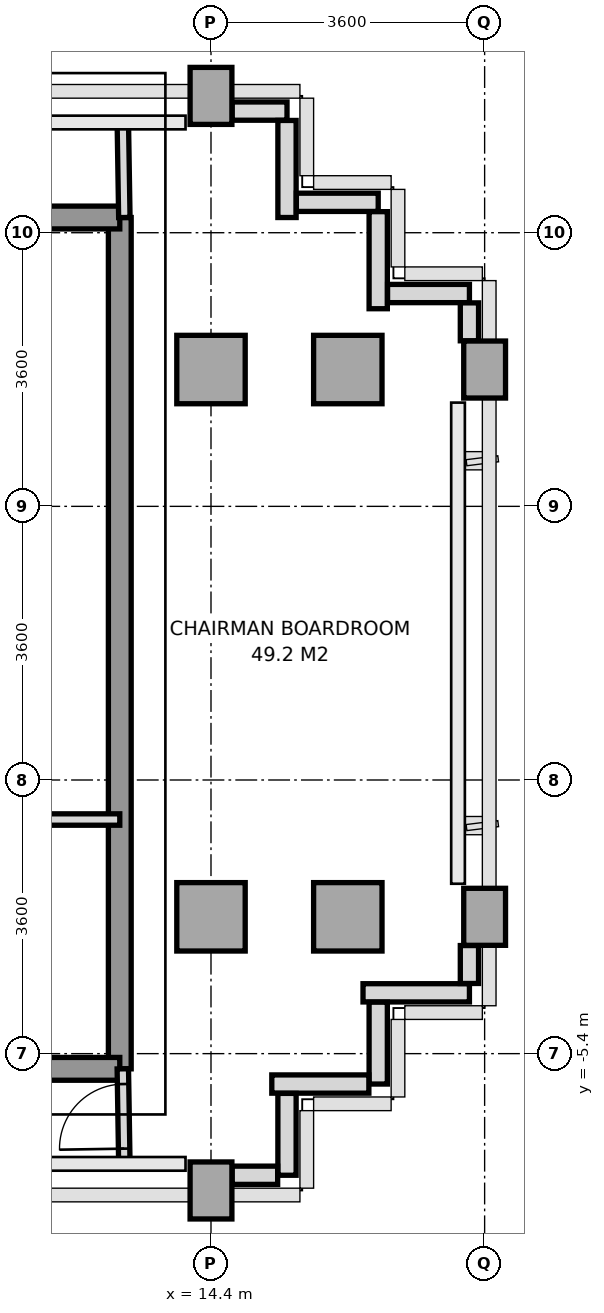
"""IFC4 building model, lengths in metres.
Left out: names, types, materials, properties, quantities, classifications, styles, units other than length and angle.
Written with IfcOpenShell. Run it as: python <this file> out.ifc"""

import sys

from ifc_helpers import new_model, si_unit, direction, frame, frame_2d, origin, origin_2d, place, context, subcontext, project, spatial, rectangle, extrude, source, transform, mapped, element, fill, save


model = new_model("IFC4")
c1 = context("Model", 3, precision=1e-05, world=origin(), true_north=direction((0.0, 1.0)))
c2 = subcontext(c1, "Body", "Model", "MODEL_VIEW")
j1 = project(units=[si_unit("LENGTHUNIT", "METRE"), si_unit("PLANEANGLEUNIT", "RADIAN")], contexts=[c1])
p1 = place(None, origin())
s1 = spatial("IfcSite", under=j1, at=p1, CompositionType="ELEMENT")
p2 = place(p1, origin())
s2 = spatial("IfcBuilding", under=s1, at=p2, CompositionType="ELEMENT")
p3 = place(p2, frame((0.0, 0.0, 226.8)))
s3 = spatial("IfcBuildingStorey", under=s2, at=p3, CompositionType="ELEMENT", Elevation=226.8)
m1 = source(origin(), c2, "Body", "SweptSolid", [
    extrude(rectangle(XDim=0.55, YDim=0.75, at=origin_2d()), origin(), (0.0, 0.0, 1.0), 3.01),
])
p4 = place(p3, frame((14.4, -7.2, 0.0), z_axis=(0.0, 0.0, 1.0), x_axis=(1.0, 0.0, 0.0)))
e1 = element("IfcColumn", 1, at=p4, inside=s3, PredefinedType="COLUMN", context=c2, shape_type="MappedRepresentation", body=[
    mapped(m1, transform((0.0, 0.0, 0.0), x_axis=(1.0, 0.0, 0.0), y_axis=(0.0, 1.0, 0.0), z_axis=(0.0, 0.0, 1.0), scale=1.0)),
])
m2 = source(origin(), c2, "Body", "SweptSolid", [
    extrude(rectangle(XDim=0.9, YDim=0.9, at=origin_2d()), origin(), (0.0, 0.0, 1.0), 3.01),
])
for number, where, z_axis, x_axis in (
    (2, (14.4, -3.6, 0.0), (0.0, 0.0, 1.0), (1.0, 0.0, 0.0)),
    (3, (14.4, 3.6, 0.0), (0.0, 0.0, 1.0), (1.0, 0.0, 0.0)),
):
    element("IfcColumn", number, at=place(p3, frame(where, z_axis=z_axis, x_axis=x_axis)), inside=s3, PredefinedType="COLUMN", context=c2, shape_type="MappedRepresentation", body=[
        mapped(m2, transform((0.0, 0.0, 0.0), x_axis=(1.0, 0.0, 0.0), y_axis=(0.0, 1.0, 0.0), z_axis=(0.0, 0.0, 1.0), scale=1.0)),
    ])
p5 = place(p3, frame((14.4, 7.2, 0.0), z_axis=(0.0, 0.0, 1.0), x_axis=(1.0, 0.0, 0.0)))
e4 = element("IfcColumn", 4, at=p5, inside=s3, PredefinedType="COLUMN", context=c2, shape_type="MappedRepresentation", body=[
    mapped(m1, transform((0.0, 0.0, 0.0), x_axis=(1.0, 0.0, 0.0), y_axis=(0.0, 1.0, 0.0), z_axis=(0.0, 0.0, 1.0), scale=1.0)),
])
for number, where, z_axis, x_axis in (
    (5, (16.2, -3.6, 0.0), (0.0, 0.0, 1.0), (1.0, 0.0, 0.0)),
    (6, (16.2, 3.6, 0.0), (0.0, 0.0, 1.0), (1.0, 0.0, 0.0)),
):
    element("IfcColumn", number, at=place(p3, frame(where, z_axis=z_axis, x_axis=x_axis)), inside=s3, PredefinedType="COLUMN", context=c2, shape_type="MappedRepresentation", body=[
        mapped(m2, transform((0.0, 0.0, 0.0), x_axis=(1.0, 0.0, 0.0), y_axis=(0.0, 1.0, 0.0), z_axis=(0.0, 0.0, 1.0), scale=1.0)),
    ])
for number, where, z_axis, x_axis in (
    (7, (18.0, -3.6, 0.0), (0.0, 0.0, 1.0), (1.0, 0.0, 0.0)),
    (8, (18.0, 3.6, 0.0), (0.0, 0.0, 1.0), (1.0, 0.0, 0.0)),
):
    element("IfcColumn", number, at=place(p3, frame(where, z_axis=z_axis, x_axis=x_axis)), inside=s3, PredefinedType="COLUMN", context=c2, shape_type="MappedRepresentation", body=[
        mapped(m1, transform((0.0, 0.0, 0.0), x_axis=(1.0, 0.0, 0.0), y_axis=(0.0, 1.0, 0.0), z_axis=(0.0, 0.0, 1.0), scale=1.0)),
    ])
p6 = place(p3, frame((17.8, -4.6, 0.0), z_axis=(0.0, 0.0, 1.0), x_axis=(-1.0, 0.0, 0.0)))
e9 = element("IfcWall", 9, at=p6, inside=s3, PredefinedType="PARAPET", context=c2, shape_type="SweptSolid", body=[
    extrude(rectangle(XDim=1.4, YDim=0.24, at=frame_2d((0.7, 0.0))), origin(), (0.0, 0.0, 1.0), 1.15),
])
p7 = place(p3, frame((16.6, -4.723, 0.0), z_axis=(0.0, 0.0, 1.0), x_axis=(0.0, -1.0, 0.0)))
e10 = element("IfcWall", 10, at=p7, inside=s3, PredefinedType="PARAPET", context=c2, shape_type="SweptSolid", body=[
    extrude(rectangle(XDim=1.077, YDim=0.24, at=frame_2d((0.539, 0.0))), origin(), (0.0, 0.0, 1.0), 1.15),
])
p8 = place(p3, frame((16.477, -5.8, 0.0), z_axis=(0.0, 0.0, 1.0), x_axis=(-1.0, 0.0, 0.0)))
e11 = element("IfcWall", 11, at=p8, inside=s3, PredefinedType="PARAPET", context=c2, shape_type="SweptSolid", body=[
    extrude(rectangle(XDim=1.277, YDim=0.24, at=frame_2d((0.639, 0.0))), origin(), (0.0, 0.0, 1.0), 1.15),
])
p9 = place(p3, frame((15.4, -5.923, 0.0), z_axis=(0.0, 0.0, 1.0), x_axis=(0.0, -1.0, 0.0)))
e12 = element("IfcWall", 12, at=p9, inside=s3, PredefinedType="PARAPET", context=c2, shape_type="SweptSolid", body=[
    extrude(rectangle(XDim=1.077, YDim=0.24, at=frame_2d((0.539, 0.0))), origin(), (0.0, 0.0, 1.0), 1.15),
])
p10 = place(p3, frame((15.277, -7.0, 0.0), z_axis=(0.0, 0.0, 1.0), x_axis=(-1.0, 0.0, 0.0)))
e13 = element("IfcWall", 13, at=p10, inside=s3, PredefinedType="PARAPET", context=c2, shape_type="SweptSolid", body=[
    extrude(rectangle(XDim=0.599, YDim=0.24, at=frame_2d((0.3, 0.0))), origin(), (0.0, 0.0, 1.0), 1.15),
])
p11 = place(p3, frame((14.678, 7.0, 0.0), z_axis=(0.0, 0.0, 1.0), x_axis=(1.0, 0.0, 0.0)))
e14 = element("IfcWall", 14, at=p11, inside=s3, PredefinedType="PARAPET", context=c2, shape_type="SweptSolid", body=[
    extrude(rectangle(XDim=0.722, YDim=0.24, at=frame_2d((0.361, 0.0))), origin(), (0.0, 0.0, 1.0), 1.15),
])
p12 = place(p3, frame((15.4, 6.877, 0.0), z_axis=(0.0, 0.0, 1.0), x_axis=(0.0, -1.0, 0.0)))
e15 = element("IfcWall", 15, at=p12, inside=s3, PredefinedType="PARAPET", context=c2, shape_type="SweptSolid", body=[
    extrude(rectangle(XDim=1.277, YDim=0.24, at=frame_2d((0.638, 0.0))), origin(), (0.0, 0.0, 1.0), 1.15),
])
p13 = place(p3, frame((15.523, 5.8, 0.0), z_axis=(0.0, 0.0, 1.0), x_axis=(1.0, 0.0, 0.0)))
e16 = element("IfcWall", 16, at=p13, inside=s3, PredefinedType="PARAPET", context=c2, shape_type="SweptSolid", body=[
    extrude(rectangle(XDim=1.077, YDim=0.24, at=frame_2d((0.539, 0.0))), origin(), (0.0, 0.0, 1.0), 1.15),
])
p14 = place(p3, frame((16.6, 5.677, 0.0), z_axis=(0.0, 0.0, 1.0), x_axis=(0.0, -1.0, 0.0)))
e17 = element("IfcWall", 17, at=p14, inside=s3, PredefinedType="PARAPET", context=c2, shape_type="SweptSolid", body=[
    extrude(rectangle(XDim=1.277, YDim=0.24, at=frame_2d((0.639, 0.0))), origin(), (0.0, 0.0, 1.0), 1.15),
])
p15 = place(p3, frame((16.723, 4.6, 0.0), z_axis=(0.0, 0.0, 1.0), x_axis=(1.0, 0.0, 0.0)))
e18 = element("IfcWall", 18, at=p15, inside=s3, PredefinedType="PARAPET", context=c2, shape_type="SweptSolid", body=[
    extrude(rectangle(XDim=1.077, YDim=0.24, at=frame_2d((0.539, 0.0))), origin(), (0.0, 0.0, 1.0), 1.15),
])
for number, where, z_axis, x_axis in (
    (19, (17.8, 4.477, 0.0), (0.0, 0.0, 1.0), (0.0, -1.0, 0.0)),
    (20, (17.8, -3.978, 0.0), (0.0, 0.0, 1.0), (0.0, -1.0, 0.0)),
):
    element("IfcWall", number, at=place(p3, frame(where, z_axis=z_axis, x_axis=x_axis)), inside=s3, PredefinedType="PARAPET", context=c2, shape_type="SweptSolid", body=[
        extrude(rectangle(XDim=0.499, YDim=0.24, at=frame_2d((0.25, 0.0))), origin(), (0.0, 0.0, 1.0), 1.15),
    ])
p16 = place(p3, frame((13.2, -5.6, 0.0), z_axis=(0.0, 0.0, 1.0), x_axis=(0.0, 1.0, 0.0)))
e21 = element("IfcWall", 21, at=p16, inside=s3, PredefinedType="SHEAR", context=c2, shape_type="SweptSolid", body=[
    extrude(rectangle(XDim=11.2, YDim=0.3, at=frame_2d((5.6, 0.0))), origin(), (0.0, 0.0, 1.0), 3.01),
])
p17 = place(p3, frame((11.356, 5.6, 0.0), z_axis=(0.0, 0.0, 1.0), x_axis=(1.0, 0.0, 0.0)))
e22 = element("IfcWall", 22, at=p17, inside=s3, PredefinedType="SHEAR", context=c2, shape_type="SweptSolid", body=[
    extrude(rectangle(XDim=1.844, YDim=0.3, at=frame_2d((0.922, 0.0))), origin(), (0.0, 0.0, 1.0), 3.01),
])
p18 = place(p3, frame((5.4, -5.6, 0.0), z_axis=(0.0, 0.0, 1.0), x_axis=(1.0, 0.0, 0.0)))
e23 = element("IfcWall", 23, at=p18, inside=s3, PredefinedType="SHEAR", context=c2, shape_type="SweptSolid", body=[
    extrude(rectangle(XDim=7.8, YDim=0.3, at=frame_2d((3.9, 0.0))), origin(), (0.0, 0.0, 1.0), 3.01),
])
p19 = place(p18, frame((5.85, 0.0, 0.0)))
e24 = element("IfcOpeningElement", 24, at=p19, cuts=e23, PredefinedType="OPENING", context=c2, shape_type="SweptSolid", body=[
    extrude(rectangle(XDim=0.8, YDim=2.1, at=frame_2d((0.4, 1.05))), frame((0.0, 0.16, 0.0), z_axis=(0.0, -1.0, 0.0), x_axis=(1.0, 0.0, 0.0)), (0.0, 0.0, 1.0), 0.32),
])
p20 = place(p18, frame((1.2, 0.0, 0.0)))
e25 = element("IfcOpeningElement", 25, at=p20, cuts=e23, PredefinedType="OPENING", context=c2, shape_type="SweptSolid", body=[
    extrude(rectangle(XDim=0.85, YDim=2.1, at=frame_2d((0.425, 1.05))), frame((0.0, 0.16, 0.0), z_axis=(0.0, -1.0, 0.0), x_axis=(1.0, 0.0, 0.0)), (0.0, 0.0, 1.0), 0.32),
])
p21 = place(p18, frame((3.4, 0.0, 0.0)))
e26 = element("IfcOpeningElement", 26, at=p21, cuts=e23, PredefinedType="OPENING", context=c2, shape_type="SweptSolid", body=[
    extrude(rectangle(XDim=0.85, YDim=2.1, at=frame_2d((0.425, 1.05))), frame((0.0, 0.16, 0.0), z_axis=(0.0, -1.0, 0.0), x_axis=(1.0, 0.0, 0.0)), (0.0, 0.0, 1.0), 0.32),
])
p22 = place(p3, frame((11.02, -2.32, 0.0), z_axis=(0.0, 0.0, 1.0), x_axis=(1.0, 0.0, 0.0)))
e27 = element("IfcWall", 27, at=p22, inside=s3, PredefinedType="PARTITIONING", context=c2, shape_type="SweptSolid", body=[
    extrude(rectangle(XDim=2.18, YDim=0.15, at=frame_2d((1.09, 0.0))), origin(), (0.0, 0.0, 1.0), 3.01),
])
p23 = place(p3, frame((13.26, 5.6, 0.0), z_axis=(0.0, 0.0, 1.0), x_axis=(-0.016013571389, 0.999871774545, 0.0)))
e28 = element("IfcWall", 28, at=p23, inside=s3, PredefinedType="PARTITIONING", context=c2, shape_type="SweptSolid", body=[
    extrude(rectangle(XDim=1.25, YDim=0.15, at=frame_2d((0.625, 0.0))), origin(), (0.0, 0.0, 1.0), 3.01),
])
p24 = place(p3, frame((13.26, -6.85, 0.0), z_axis=(0.0, 0.0, 1.0), x_axis=(-0.016013571389, 0.999871774545, 0.0)))
e29 = element("IfcWall", 29, at=p24, inside=s3, PredefinedType="PARTITIONING", context=c2, shape_type="SweptSolid", body=[
    extrude(rectangle(XDim=1.25, YDim=0.15, at=frame_2d((0.625, 0.0))), origin(), (0.0, 0.0, 1.0), 3.01),
])
p25 = place(p24, frame((0.2, 0.0, 0.0)))
e30 = element("IfcOpeningElement", 30, at=p25, cuts=e29, PredefinedType="OPENING", context=c2, shape_type="SweptSolid", body=[
    extrude(rectangle(XDim=0.85, YDim=2.1, at=frame_2d((0.425, 1.05))), frame((0.0, 0.085, 0.0), z_axis=(0.0, -1.0, 0.0), x_axis=(1.0, 0.0, 0.0)), (0.0, 0.0, 1.0), 0.17),
])
m3 = source(origin(), c2, "Body", "SweptSolid", [
    extrude(rectangle(XDim=0.85, YDim=2.1, at=frame_2d((0.425, 1.05))), frame((0.0, 0.025, 0.0), z_axis=(0.0, -1.0, 0.0), x_axis=(1.0, 0.0, 0.0)), (0.0, 0.0, 1.0), 0.05),
])
p26 = place(p25, origin())
e31 = element("IfcDoor", 31, at=p26, inside=s3, OperationType="SINGLE_SWING_LEFT", PredefinedType="DOOR", context=c2, shape_type="MappedRepresentation", body=[
    mapped(m3, transform((0.0, 0.0, 0.0), x_axis=(1.0, 0.0, 0.0), y_axis=(0.0, 1.0, 0.0), z_axis=(0.0, 0.0, 1.0), scale=1.0)),
])
fill(e30, e31)
save(model, sys.argv[1])
